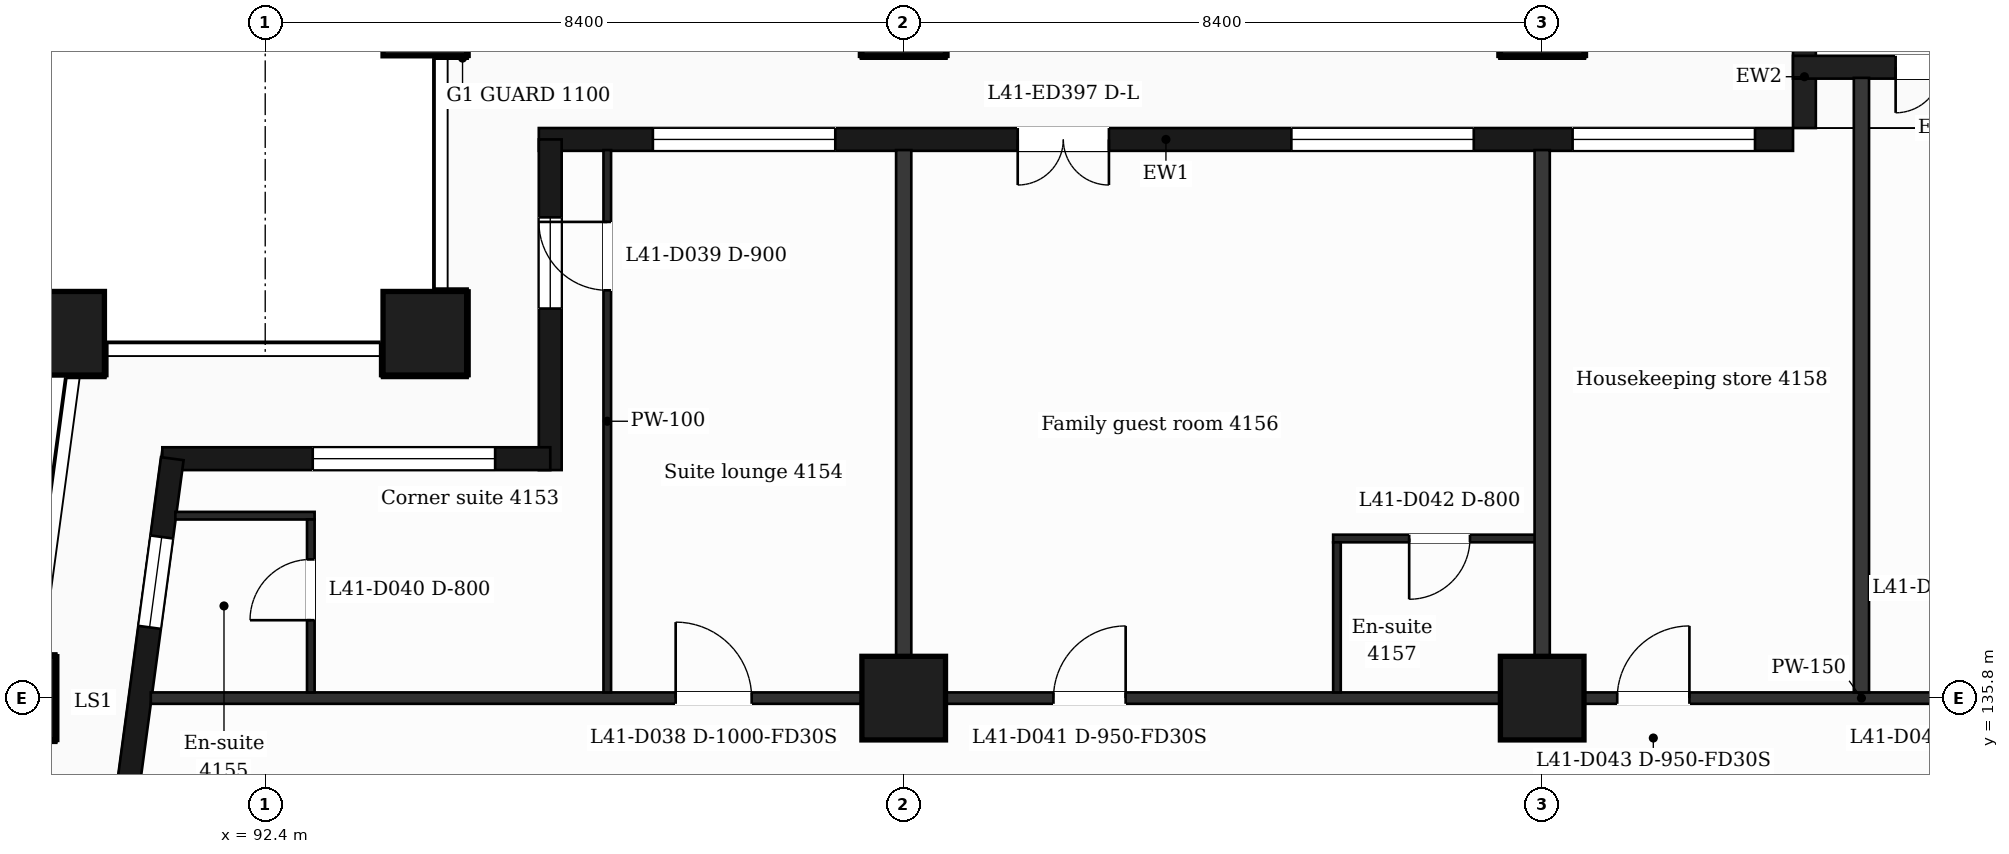
"""IFC4 building model, lengths in metres.
Left out: names, types, materials, properties, quantities, classifications, styles, units other than length and angle.
Written with IfcOpenShell. Run it as: python <this file> out.ifc"""

import sys

from ifc_helpers import new_model, si_unit, direction, frame, frame_2d, origin, origin_2d, place, context, subcontext, project, spatial, rectangle, extrude, element, fill, save


model = new_model("IFC4")
c1 = context("Model", 3, precision=1e-05, world=origin(), true_north=direction((0.0, 1.0)))
c2 = subcontext(c1, "Body", "Model", "MODEL_VIEW")
j1 = project(units=[si_unit("LENGTHUNIT", "METRE"), si_unit("PLANEANGLEUNIT", "RADIAN")], contexts=[c1])
p1 = place(None, origin())
s1 = spatial("IfcSite", under=j1, at=p1, CompositionType="ELEMENT")
p2 = place(p1, origin())
s2 = spatial("IfcBuilding", under=s1, at=p2, CompositionType="ELEMENT")
p3 = place(p2, frame((0.0, 0.0, 173.7)))
s3 = spatial("IfcBuildingStorey", under=s2, at=p3, CompositionType="ELEMENT", Elevation=173.7)
for number, where, z_axis, x_axis in (
    (1, (94.5, 140.6, 0.0), (0.0, 0.0, 1.0), (1.0, 0.0, 0.0)),
    (2, (89.735, 140.6, 0.0), (0.0, 0.0, 1.0), (1.0, 0.0, 0.0)),
    (3, (100.8, 135.8, 0.0), (0.0, 0.0, 1.0), (1.0, 0.0, 0.0)),
    (4, (109.2, 135.8, 0.0), (0.0, 0.0, 1.0), (1.0, 0.0, 0.0)),
    (5, (89.088, 135.8, 0.0), (0.0, 0.0, 1.0), (1.0, 0.0, 0.0)),
    (6, (100.8, 144.8, 0.0), (0.0, 0.0, 1.0), (1.0, 0.0, 0.0)),
    (7, (109.2, 144.8, 0.0), (0.0, 0.0, 1.0), (1.0, 0.0, 0.0)),
    (8, (94.5, 144.8, 0.0), (0.0, 0.0, 1.0), (1.0, 0.0, 0.0)),
):
    element("IfcColumn", number, at=place(p3, frame(where, z_axis=z_axis, x_axis=x_axis)), inside=s3, PredefinedType="COLUMN", context=c2, shape_type="SweptSolid", body=[
        extrude(rectangle(XDim=1.1, YDim=1.1, at=origin_2d()), origin(), (0.0, 0.0, 1.0), 3.7),
    ])
p4 = place(p3, frame((112.5, 143.15, 0.0), z_axis=(0.0, 0.0, 1.0), x_axis=(-1.0, 0.0, 0.0)))
e9 = element("IfcWall", 9, at=p4, inside=s3, PredefinedType="SOLIDWALL", context=c2, shape_type="SweptSolid", body=[
    extrude(rectangle(XDim=16.5, YDim=0.3, at=frame_2d((8.25, 0.0))), origin(), (0.0, 0.0, 1.0), 3.38),
])
p5 = place(p4, frame((0.5, 0.0, 0.9)))
e10 = element("IfcOpeningElement", 10, at=p5, cuts=e9, PredefinedType="OPENING", context=c2, shape_type="SweptSolid", body=[
    extrude(rectangle(XDim=2.4, YDim=2.1, at=frame_2d((1.2, 1.05))), frame((0.0, 0.16, 0.0), z_axis=(0.0, -1.0, 0.0), x_axis=(1.0, 0.0, 0.0)), (0.0, 0.0, 1.0), 0.32),
])
p6 = place(p4, frame((4.2, 0.0, 0.9)))
e11 = element("IfcOpeningElement", 11, at=p6, cuts=e9, PredefinedType="OPENING", context=c2, shape_type="SweptSolid", body=[
    extrude(rectangle(XDim=2.4, YDim=2.1, at=frame_2d((1.2, 1.05))), frame((0.0, 0.16, 0.0), z_axis=(0.0, -1.0, 0.0), x_axis=(1.0, 0.0, 0.0)), (0.0, 0.0, 1.0), 0.32),
])
p7 = place(p4, frame((9.0, 0.0, 0.0)))
e12 = element("IfcOpeningElement", 12, at=p7, cuts=e9, PredefinedType="OPENING", context=c2, shape_type="SweptSolid", body=[
    extrude(rectangle(XDim=1.2, YDim=2.4, at=frame_2d((0.6, 1.2))), frame((0.0, 0.16, 0.0), z_axis=(0.0, -1.0, 0.0), x_axis=(1.0, 0.0, 0.0)), (0.0, 0.0, 1.0), 0.32),
])
p8 = place(p4, frame((12.6, 0.0, 0.9)))
e13 = element("IfcOpeningElement", 13, at=p8, cuts=e9, PredefinedType="OPENING", context=c2, shape_type="SweptSolid", body=[
    extrude(rectangle(XDim=2.4, YDim=2.1, at=frame_2d((1.2, 1.05))), frame((0.0, 0.16, 0.0), z_axis=(0.0, -1.0, 0.0), x_axis=(1.0, 0.0, 0.0)), (0.0, 0.0, 1.0), 0.32),
])
p9 = place(p3, frame((112.65, 143.3, 0.0), z_axis=(0.0, 0.0, 1.0), x_axis=(0.0, 1.0, 0.0)))
e14 = element("IfcWall", 14, at=p9, inside=s3, PredefinedType="SOLIDWALL", context=c2, shape_type="SweptSolid", body=[
    extrude(rectangle(XDim=1.35, YDim=0.3, at=frame_2d((0.675, 0.0))), origin(), (0.0, 0.0, 1.0), 3.38),
])
p10 = place(p3, frame((116.4, 144.1, 0.0), z_axis=(0.0, 0.0, 1.0), x_axis=(-1.0, 0.0, 0.0)))
e15 = element("IfcWall", 15, at=p10, inside=s3, PredefinedType="SOLIDWALL", context=c2, shape_type="SweptSolid", body=[
    extrude(rectangle(XDim=3.9, YDim=0.3, at=frame_2d((1.95, 0.0))), origin(), (0.0, 0.0, 1.0), 3.38),
])
p11 = place(p10, frame((1.35, 0.0, 0.0)))
e16 = element("IfcOpeningElement", 16, at=p11, cuts=e15, PredefinedType="OPENING", context=c2, shape_type="SweptSolid", body=[
    extrude(rectangle(XDim=1.2, YDim=2.4, at=frame_2d((0.6, 1.2))), frame((0.0, 0.16, 0.0), z_axis=(0.0, -1.0, 0.0), x_axis=(1.0, 0.0, 0.0)), (0.0, 0.0, 1.0), 0.32),
])
p12 = place(p3, frame((96.15, 143.15, 0.0), z_axis=(0.0, 0.0, 1.0), x_axis=(0.0, -1.0, 0.0)))
e17 = element("IfcWall", 17, at=p12, inside=s3, PredefinedType="SOLIDWALL", context=c2, shape_type="SweptSolid", body=[
    extrude(rectangle(XDim=4.35, YDim=0.3, at=frame_2d((2.175, 0.0))), origin(), (0.0, 0.0, 1.0), 3.38),
])
p13 = place(p12, frame((1.025, 0.0, 0.9)))
e18 = element("IfcOpeningElement", 18, at=p13, cuts=e17, PredefinedType="OPENING", context=c2, shape_type="SweptSolid", body=[
    extrude(rectangle(XDim=1.2, YDim=2.1, at=frame_2d((0.6, 1.05))), frame((0.0, 0.16, 0.0), z_axis=(0.0, -1.0, 0.0), x_axis=(1.0, 0.0, 0.0)), (0.0, 0.0, 1.0), 0.32),
])
p14 = place(p3, frame((96.15, 138.95, 0.0), z_axis=(0.0, 0.0, 1.0), x_axis=(-1.0, 0.0, 0.0)))
e19 = element("IfcWall", 19, at=p14, inside=s3, PredefinedType="SOLIDWALL", context=c2, shape_type="SweptSolid", body=[
    extrude(rectangle(XDim=5.104, YDim=0.3, at=frame_2d((2.552, 0.0))), origin(), (0.0, 0.0, 1.0), 3.38),
])
p15 = place(p14, frame((0.725, 0.0, 0.9)))
e20 = element("IfcOpeningElement", 20, at=p15, cuts=e19, PredefinedType="OPENING", context=c2, shape_type="SweptSolid", body=[
    extrude(rectangle(XDim=2.4, YDim=2.1, at=frame_2d((1.2, 1.05))), frame((0.0, 0.16, 0.0), z_axis=(0.0, -1.0, 0.0), x_axis=(1.0, 0.0, 0.0)), (0.0, 0.0, 1.0), 0.32),
])
p16 = place(p3, frame((91.177, 138.95, 0.0), z_axis=(0.0, 0.0, 1.0), x_axis=(-0.133426664613, -0.991058689065, 0.0)))
e21 = element("IfcWall", 21, at=p16, inside=s3, PredefinedType="SOLIDWALL", context=c2, shape_type="SweptSolid", body=[
    extrude(rectangle(XDim=6.609, YDim=0.3, at=frame_2d((3.305, 0.0))), origin(), (0.0, 0.0, 1.0), 3.38),
])
p17 = place(p16, frame((1.039, 0.0, 0.9)))
e22 = element("IfcOpeningElement", 22, at=p17, cuts=e21, PredefinedType="OPENING", context=c2, shape_type="SweptSolid", body=[
    extrude(rectangle(XDim=1.2, YDim=2.1, at=frame_2d((0.6, 1.05))), frame((0.0, 0.16, 0.0), z_axis=(0.0, -1.0, 0.0), x_axis=(1.0, 0.0, 0.0)), (0.0, 0.0, 1.0), 0.32),
])
p18 = place(p16, frame((4.294, 0.0, 0.0)))
e23 = element("IfcOpeningElement", 23, at=p18, cuts=e21, PredefinedType="OPENING", context=c2, shape_type="SweptSolid", body=[
    extrude(rectangle(XDim=1.2, YDim=2.4, at=frame_2d((0.6, 1.2))), frame((0.0, 0.16, 0.0), z_axis=(0.0, -1.0, 0.0), x_axis=(1.0, 0.0, 0.0)), (0.0, 0.0, 1.0), 0.32),
])
p19 = place(p3, frame((90.895, 135.8, 0.0), z_axis=(0.0, 0.0, 1.0), x_axis=(1.0, 0.0, 0.0)))
e24 = element("IfcWall", 24, at=p19, inside=s3, PredefinedType="PARTITIONING", context=c2, shape_type="SweptSolid", body=[
    extrude(rectangle(XDim=45.011, YDim=0.15, at=frame_2d((22.505, 0.0))), origin(), (0.0, 0.0, 1.0), 3.38),
])
p20 = place(p19, frame((6.906, 0.0, 0.0)))
e25 = element("IfcOpeningElement", 25, at=p20, cuts=e24, PredefinedType="OPENING", context=c2, shape_type="SweptSolid", body=[
    extrude(rectangle(XDim=1.0, YDim=2.1, at=frame_2d((0.5, 1.05))), frame((0.0, 0.085, 0.0), z_axis=(0.0, -1.0, 0.0), x_axis=(1.0, 0.0, 0.0)), (0.0, 0.0, 1.0), 0.17),
])
p21 = place(p19, frame((11.875, 0.0, 0.0)))
e26 = element("IfcOpeningElement", 26, at=p21, cuts=e24, PredefinedType="OPENING", context=c2, shape_type="SweptSolid", body=[
    extrude(rectangle(XDim=0.95, YDim=2.1, at=frame_2d((0.475, 1.05))), frame((0.0, 0.085, 0.0), z_axis=(0.0, -1.0, 0.0), x_axis=(1.0, 0.0, 0.0)), (0.0, 0.0, 1.0), 0.17),
])
p22 = place(p19, frame((19.292, 0.0, 0.0)))
e27 = element("IfcOpeningElement", 27, at=p22, cuts=e24, PredefinedType="OPENING", context=c2, shape_type="SweptSolid", body=[
    extrude(rectangle(XDim=0.95, YDim=2.1, at=frame_2d((0.475, 1.05))), frame((0.0, 0.085, 0.0), z_axis=(0.0, -1.0, 0.0), x_axis=(1.0, 0.0, 0.0)), (0.0, 0.0, 1.0), 0.17),
])
p23 = place(p19, frame((23.418, 0.0, 0.0)))
e28 = element("IfcOpeningElement", 28, at=p23, cuts=e24, PredefinedType="OPENING", context=c2, shape_type="SweptSolid", body=[
    extrude(rectangle(XDim=0.95, YDim=2.1, at=frame_2d((0.475, 1.05))), frame((0.0, 0.085, 0.0), z_axis=(0.0, -1.0, 0.0), x_axis=(1.0, 0.0, 0.0)), (0.0, 0.0, 1.0), 0.17),
])
p24 = place(p19, frame((29.425, 0.0, 0.0)))
e29 = element("IfcOpeningElement", 29, at=p24, cuts=e24, PredefinedType="OPENING", context=c2, shape_type="SweptSolid", body=[
    extrude(rectangle(XDim=0.95, YDim=2.1, at=frame_2d((0.475, 1.05))), frame((0.0, 0.085, 0.0), z_axis=(0.0, -1.0, 0.0), x_axis=(1.0, 0.0, 0.0)), (0.0, 0.0, 1.0), 0.17),
])
p25 = place(p19, frame((31.63, 0.0, 0.0)))
e30 = element("IfcOpeningElement", 30, at=p25, cuts=e24, PredefinedType="OPENING", context=c2, shape_type="SweptSolid", body=[
    extrude(rectangle(XDim=0.95, YDim=2.1, at=frame_2d((0.475, 1.05))), frame((0.0, 0.085, 0.0), z_axis=(0.0, -1.0, 0.0), x_axis=(1.0, 0.0, 0.0)), (0.0, 0.0, 1.0), 0.17),
])
p26 = place(p19, frame((36.775, 0.0, 0.0)))
e31 = element("IfcOpeningElement", 31, at=p26, cuts=e24, PredefinedType="OPENING", context=c2, shape_type="SweptSolid", body=[
    extrude(rectangle(XDim=1.0, YDim=2.1, at=frame_2d((0.5, 1.05))), frame((0.0, 0.085, 0.0), z_axis=(0.0, -1.0, 0.0), x_axis=(1.0, 0.0, 0.0)), (0.0, 0.0, 1.0), 0.17),
])
p27 = place(p3, frame((106.45, 137.9, 0.0), z_axis=(0.0, 0.0, 1.0), x_axis=(1.0, 0.0, 0.0)))
e32 = element("IfcWall", 32, at=p27, inside=s3, PredefinedType="PARTITIONING", context=c2, shape_type="SweptSolid", body=[
    extrude(rectangle(XDim=2.75, YDim=0.1, at=frame_2d((1.375, 0.0))), origin(), (0.0, 0.0, 1.0), 3.38),
])
p28 = place(p27, frame((1.0, 0.0, 0.0)))
e33 = element("IfcOpeningElement", 33, at=p28, cuts=e32, PredefinedType="OPENING", context=c2, shape_type="SweptSolid", body=[
    extrude(rectangle(XDim=0.8, YDim=2.1, at=frame_2d((0.4, 1.05))), frame((0.0, 0.06, 0.0), z_axis=(0.0, -1.0, 0.0), x_axis=(1.0, 0.0, 0.0)), (0.0, 0.0, 1.0), 0.12),
])
p29 = place(p3, frame((91.218, 138.2, 0.0), z_axis=(0.0, 0.0, 1.0), x_axis=(1.0, 0.0, 0.0)))
e34 = element("IfcWall", 34, at=p29, inside=s3, PredefinedType="PARTITIONING", context=c2, shape_type="SweptSolid", body=[
    extrude(rectangle(XDim=1.832, YDim=0.1, at=frame_2d((0.916, 0.0))), origin(), (0.0, 0.0, 1.0), 3.38),
])
p30 = place(p3, frame((93.0, 135.875, 0.0), z_axis=(0.0, 0.0, 1.0), x_axis=(0.0, 1.0, 0.0)))
e35 = element("IfcWall", 35, at=p30, inside=s3, PredefinedType="PARTITIONING", context=c2, shape_type="SweptSolid", body=[
    extrude(rectangle(XDim=2.275, YDim=0.1, at=frame_2d((1.137, 0.0))), origin(), (0.0, 0.0, 1.0), 3.38),
])
p31 = place(p30, frame((0.95, 0.0, 0.0)))
e36 = element("IfcOpeningElement", 36, at=p31, cuts=e35, PredefinedType="OPENING", context=c2, shape_type="SweptSolid", body=[
    extrude(rectangle(XDim=0.8, YDim=2.1, at=frame_2d((0.4, 1.05))), frame((0.0, 0.06, 0.0), z_axis=(0.0, -1.0, 0.0), x_axis=(1.0, 0.0, 0.0)), (0.0, 0.0, 1.0), 0.12),
])
p32 = place(p3, frame((96.9, 135.875, 0.0), z_axis=(0.0, 0.0, 1.0), x_axis=(0.0, 1.0, 0.0)))
e37 = element("IfcWall", 37, at=p32, inside=s3, PredefinedType="PARTITIONING", context=c2, shape_type="SweptSolid", body=[
    extrude(rectangle(XDim=7.135, YDim=0.1, at=frame_2d((3.567, 0.0))), origin(), (0.0, 0.0, 1.0), 3.38),
])
p33 = place(p32, frame((5.29, 0.0, 0.0)))
e38 = element("IfcOpeningElement", 38, at=p33, cuts=e37, PredefinedType="OPENING", context=c2, shape_type="SweptSolid", body=[
    extrude(rectangle(XDim=0.9, YDim=2.1, at=frame_2d((0.45, 1.05))), frame((0.0, 0.06, 0.0), z_axis=(0.0, -1.0, 0.0), x_axis=(1.0, 0.0, 0.0)), (0.0, 0.0, 1.0), 0.12),
])
p34 = place(p3, frame((100.8, 135.875, 0.0), z_axis=(0.0, 0.0, 1.0), x_axis=(0.0, 1.0, 0.0)))
e39 = element("IfcWall", 39, at=p34, inside=s3, PredefinedType="PARTITIONING", context=c2, shape_type="SweptSolid", body=[
    extrude(rectangle(XDim=7.135, YDim=0.2, at=frame_2d((3.567, 0.0))), origin(), (0.0, 0.0, 1.0), 3.38),
])
p35 = place(p3, frame((106.5, 135.875, 0.0), z_axis=(0.0, 0.0, 1.0), x_axis=(0.0, 1.0, 0.0)))
e40 = element("IfcWall", 40, at=p35, inside=s3, PredefinedType="PARTITIONING", context=c2, shape_type="SweptSolid", body=[
    extrude(rectangle(XDim=1.975, YDim=0.1, at=frame_2d((0.988, 0.0))), origin(), (0.0, 0.0, 1.0), 3.38),
])
p36 = place(p3, frame((109.2, 135.875, 0.0), z_axis=(0.0, 0.0, 1.0), x_axis=(0.0, 1.0, 0.0)))
e41 = element("IfcWall", 41, at=p36, inside=s3, PredefinedType="PARTITIONING", context=c2, shape_type="SweptSolid", body=[
    extrude(rectangle(XDim=7.135, YDim=0.2, at=frame_2d((3.567, 0.0))), origin(), (0.0, 0.0, 1.0), 3.38),
])
p37 = place(p3, frame((113.4, 135.875, 0.0), z_axis=(0.0, 0.0, 1.0), x_axis=(0.0, 1.0, 0.0)))
e42 = element("IfcWall", 42, at=p37, inside=s3, PredefinedType="PARTITIONING", context=c2, shape_type="SweptSolid", body=[
    extrude(rectangle(XDim=8.085, YDim=0.2, at=frame_2d((4.042, 0.0))), origin(), (0.0, 0.0, 1.0), 3.38),
])
p38 = place(p5, origin())
e43 = element("IfcWindow", 43, at=p38, inside=s3, PartitioningType="SINGLE_PANEL", PredefinedType="WINDOW", context=c2, shape_type="SweptSolid", body=[
    extrude(rectangle(XDim=2.4, YDim=2.1, at=frame_2d((1.2, 1.05))), frame((0.0, 0.03, 0.0), z_axis=(0.0, -1.0, 0.0), x_axis=(1.0, 0.0, 0.0)), (0.0, 0.0, 1.0), 0.06),
])
fill(e10, e43)
p39 = place(p6, origin())
e44 = element("IfcWindow", 44, at=p39, inside=s3, PartitioningType="SINGLE_PANEL", PredefinedType="WINDOW", context=c2, shape_type="SweptSolid", body=[
    extrude(rectangle(XDim=2.4, YDim=2.1, at=frame_2d((1.2, 1.05))), frame((0.0, 0.03, 0.0), z_axis=(0.0, -1.0, 0.0), x_axis=(1.0, 0.0, 0.0)), (0.0, 0.0, 1.0), 0.06),
])
fill(e11, e44)
p40 = place(p7, origin())
e45 = element("IfcDoor", 45, at=p40, inside=s3, OperationType="DOUBLE_DOOR_SINGLE_SWING", PredefinedType="DOOR", context=c2, shape_type="SweptSolid", body=[
    extrude(rectangle(XDim=1.2, YDim=2.4, at=frame_2d((0.6, 1.2))), frame((0.0, 0.025, 0.0), z_axis=(0.0, -1.0, 0.0), x_axis=(1.0, 0.0, 0.0)), (0.0, 0.0, 1.0), 0.05),
])
fill(e12, e45)
p41 = place(p8, origin())
e46 = element("IfcWindow", 46, at=p41, inside=s3, PartitioningType="SINGLE_PANEL", PredefinedType="WINDOW", context=c2, shape_type="SweptSolid", body=[
    extrude(rectangle(XDim=2.4, YDim=2.1, at=frame_2d((1.2, 1.05))), frame((0.0, 0.03, 0.0), z_axis=(0.0, -1.0, 0.0), x_axis=(1.0, 0.0, 0.0)), (0.0, 0.0, 1.0), 0.06),
])
fill(e13, e46)
p42 = place(p11, origin())
e47 = element("IfcDoor", 47, at=p42, inside=s3, OperationType="DOUBLE_DOOR_SINGLE_SWING", PredefinedType="DOOR", context=c2, shape_type="SweptSolid", body=[
    extrude(rectangle(XDim=1.2, YDim=2.4, at=frame_2d((0.6, 1.2))), frame((0.0, 0.025, 0.0), z_axis=(0.0, -1.0, 0.0), x_axis=(1.0, 0.0, 0.0)), (0.0, 0.0, 1.0), 0.05),
])
fill(e16, e47)
p43 = place(p13, origin())
e48 = element("IfcWindow", 48, at=p43, inside=s3, PartitioningType="SINGLE_PANEL", PredefinedType="WINDOW", context=c2, shape_type="SweptSolid", body=[
    extrude(rectangle(XDim=1.2, YDim=2.1, at=frame_2d((0.6, 1.05))), frame((0.0, 0.03, 0.0), z_axis=(0.0, -1.0, 0.0), x_axis=(1.0, 0.0, 0.0)), (0.0, 0.0, 1.0), 0.06),
])
fill(e18, e48)
p44 = place(p15, origin())
e49 = element("IfcWindow", 49, at=p44, inside=s3, PartitioningType="SINGLE_PANEL", PredefinedType="WINDOW", context=c2, shape_type="SweptSolid", body=[
    extrude(rectangle(XDim=2.4, YDim=2.1, at=frame_2d((1.2, 1.05))), frame((0.0, 0.03, 0.0), z_axis=(0.0, -1.0, 0.0), x_axis=(1.0, 0.0, 0.0)), (0.0, 0.0, 1.0), 0.06),
])
fill(e20, e49)
p45 = place(p17, origin())
e50 = element("IfcWindow", 50, at=p45, inside=s3, PartitioningType="SINGLE_PANEL", PredefinedType="WINDOW", context=c2, shape_type="SweptSolid", body=[
    extrude(rectangle(XDim=1.2, YDim=2.1, at=frame_2d((0.6, 1.05))), frame((0.0, 0.03, 0.0), z_axis=(0.0, -1.0, 0.0), x_axis=(1.0, 0.0, 0.0)), (0.0, 0.0, 1.0), 0.06),
])
fill(e22, e50)
p46 = place(p20, origin())
e51 = element("IfcDoor", 51, at=p46, inside=s3, OperationType="SINGLE_SWING_LEFT", PredefinedType="DOOR", context=c2, shape_type="SweptSolid", body=[
    extrude(rectangle(XDim=1.0, YDim=2.1, at=frame_2d((0.5, 1.05))), frame((0.0, 0.025, 0.0), z_axis=(0.0, -1.0, 0.0), x_axis=(1.0, 0.0, 0.0)), (0.0, 0.0, 1.0), 0.05),
])
fill(e25, e51)
p47 = place(p33, origin())
e52 = element("IfcDoor", 52, at=p47, inside=s3, OperationType="SINGLE_SWING_RIGHT", PredefinedType="DOOR", context=c2, shape_type="SweptSolid", body=[
    extrude(rectangle(XDim=0.9, YDim=2.1, at=frame_2d((0.45, 1.05))), frame((0.0, 0.025, 0.0), z_axis=(0.0, -1.0, 0.0), x_axis=(1.0, 0.0, 0.0)), (0.0, 0.0, 1.0), 0.05),
])
fill(e38, e52)
p48 = place(p31, origin())
e53 = element("IfcDoor", 53, at=p48, inside=s3, OperationType="SINGLE_SWING_LEFT", PredefinedType="DOOR", context=c2, shape_type="SweptSolid", body=[
    extrude(rectangle(XDim=0.8, YDim=2.1, at=frame_2d((0.4, 1.05))), frame((0.0, 0.025, 0.0), z_axis=(0.0, -1.0, 0.0), x_axis=(1.0, 0.0, 0.0)), (0.0, 0.0, 1.0), 0.05),
])
fill(e36, e53)
p49 = place(p21, origin())
e54 = element("IfcDoor", 54, at=p49, inside=s3, OperationType="SINGLE_SWING_RIGHT", PredefinedType="DOOR", context=c2, shape_type="SweptSolid", body=[
    extrude(rectangle(XDim=0.95, YDim=2.1, at=frame_2d((0.475, 1.05))), frame((0.0, 0.025, 0.0), z_axis=(0.0, -1.0, 0.0), x_axis=(1.0, 0.0, 0.0)), (0.0, 0.0, 1.0), 0.05),
])
fill(e26, e54)
p50 = place(p28, origin())
e55 = element("IfcDoor", 55, at=p50, inside=s3, OperationType="SINGLE_SWING_LEFT", PredefinedType="DOOR", context=c2, shape_type="SweptSolid", body=[
    extrude(rectangle(XDim=0.8, YDim=2.1, at=frame_2d((0.4, 1.05))), frame((0.0, 0.025, 0.0), z_axis=(0.0, -1.0, 0.0), x_axis=(1.0, 0.0, 0.0)), (0.0, 0.0, 1.0), 0.05),
])
fill(e33, e55)
p51 = place(p22, origin())
e56 = element("IfcDoor", 56, at=p51, inside=s3, OperationType="SINGLE_SWING_RIGHT", PredefinedType="DOOR", context=c2, shape_type="SweptSolid", body=[
    extrude(rectangle(XDim=0.95, YDim=2.1, at=frame_2d((0.475, 1.05))), frame((0.0, 0.025, 0.0), z_axis=(0.0, -1.0, 0.0), x_axis=(1.0, 0.0, 0.0)), (0.0, 0.0, 1.0), 0.05),
])
fill(e27, e56)
save(model, sys.argv[1])
